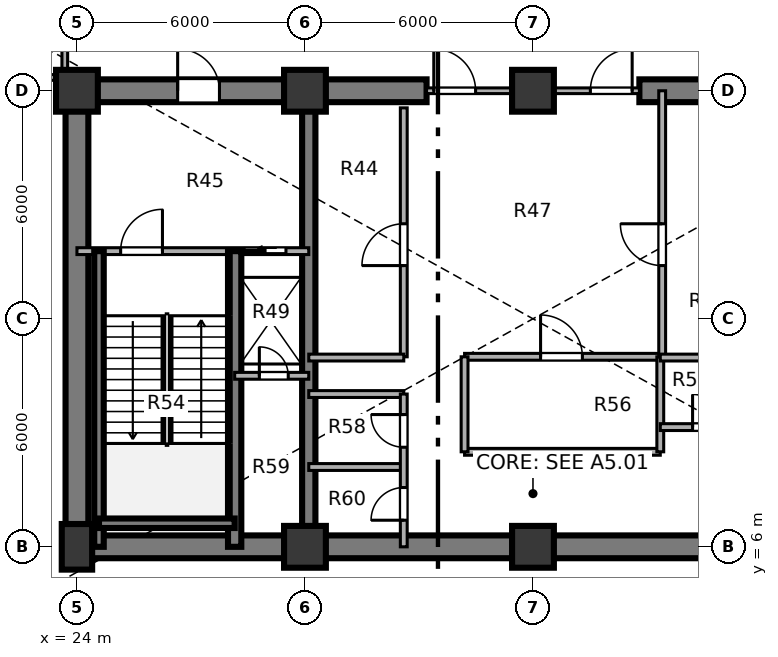
"""IFC4 building model, lengths in metres.
Left out: names, types, materials, properties, quantities, classifications, styles, units other than length and angle.
Written with IfcOpenShell. Run it as: python <this file> out.ifc"""

import sys

from ifc_helpers import new_model, si_unit, direction, frame, frame_2d, origin, origin_2d, place, context, subcontext, project, spatial, rectangle, extrude, source, transform, mapped, element, fill, save


model = new_model("IFC4")
c1 = context("Model", 3, precision=1e-05, world=origin(), true_north=direction((0.0, 1.0)))
c2 = subcontext(c1, "Body", "Model", "MODEL_VIEW")
j1 = project(units=[si_unit("LENGTHUNIT", "METRE"), si_unit("PLANEANGLEUNIT", "RADIAN")], contexts=[c1])
p1 = place(None, origin())
s1 = spatial("IfcSite", under=j1, at=p1, CompositionType="ELEMENT")
p2 = place(p1, origin())
s2 = spatial("IfcBuilding", under=s1, at=p2, CompositionType="ELEMENT")
p3 = place(p2, frame((0.0, 0.0, -4.86)))
s3 = spatial("IfcBuildingStorey", under=s2, at=p3, CompositionType="ELEMENT", Elevation=-4.86)
m1 = source(origin(), c2, "Body", "SweptSolid", [
    extrude(rectangle(XDim=0.8, YDim=1.2, at=origin_2d()), origin(), (0.0, 0.0, 1.0), 4.86),
])
p4 = place(p3, frame((24.0, 6.0, 0.0), z_axis=(0.0, 0.0, 1.0), x_axis=(1.0, 0.0, 0.0)))
e1 = element("IfcColumn", 1, at=p4, inside=s3, PredefinedType="COLUMN", context=c2, shape_type="MappedRepresentation", body=[
    mapped(m1, transform((0.0, 0.0, 0.0), x_axis=(1.0, 0.0, 0.0), y_axis=(0.0, 1.0, 0.0), z_axis=(0.0, 0.0, 1.0), scale=1.0)),
])
m2 = source(origin(), c2, "Body", "SweptSolid", [
    extrude(rectangle(XDim=1.1, YDim=1.1, at=origin_2d()), origin(), (0.0, 0.0, 1.0), 4.86),
])
for number, where, z_axis, x_axis in (
    (2, (30.0, 6.0, 0.0), (0.0, 0.0, 1.0), (1.0, 0.0, 0.0)),
    (3, (36.0, 6.0, 0.0), (0.0, 0.0, 1.0), (1.0, 0.0, 0.0)),
    (4, (24.0, 18.0, 0.0), (0.0, 0.0, 1.0), (1.0, 0.0, 0.0)),
    (5, (30.0, 18.0, 0.0), (0.0, 0.0, 1.0), (1.0, 0.0, 0.0)),
    (6, (36.0, 18.0, 0.0), (0.0, 0.0, 1.0), (1.0, 0.0, 0.0)),
):
    element("IfcColumn", number, at=place(p3, frame(where, z_axis=z_axis, x_axis=x_axis)), inside=s3, PredefinedType="COLUMN", context=c2, shape_type="MappedRepresentation", body=[
        mapped(m2, transform((0.0, 0.0, 0.0), x_axis=(1.0, 0.0, 0.0), y_axis=(0.0, 1.0, 0.0), z_axis=(0.0, 0.0, 1.0), scale=1.0)),
    ])
p5 = place(p3, frame((48.3, 6.0, 0.0), z_axis=(0.0, 0.0, 1.0), x_axis=(-1.0, 0.0, 0.0)))
e7 = element("IfcWall", 7, at=p5, inside=s3, PredefinedType="SHEAR", context=c2, shape_type="SweptSolid", body=[
    extrude(rectangle(XDim=24.6, YDim=0.6, at=frame_2d((12.3, 0.0))), origin(), (0.0, 0.0, 1.0), 4.86),
])
p6 = place(p3, frame((24.0, 6.0, 0.0), z_axis=(0.0, 0.0, 1.0), x_axis=(0.0, 1.0, 0.0)))
e8 = element("IfcWall", 8, at=p6, inside=s3, PredefinedType="SHEAR", context=c2, shape_type="SweptSolid", body=[
    extrude(rectangle(XDim=12.0, YDim=0.6, at=frame_2d((6.0, 0.0))), origin(), (0.0, 0.0, 1.0), 4.86),
])
p7 = place(p3, frame((23.7, 18.0, 0.0), z_axis=(0.0, 0.0, 1.0), x_axis=(1.0, 0.0, 0.0)))
e9 = element("IfcWall", 9, at=p7, inside=s3, PredefinedType="SHEAR", context=c2, shape_type="SweptSolid", body=[
    extrude(rectangle(XDim=9.5, YDim=0.6, at=frame_2d((4.75, 0.0))), origin(), (0.0, 0.0, 1.0), 4.86),
])
p8 = place(p7, frame((2.95, 0.0, 0.0)))
e10 = element("IfcOpeningElement", 10, at=p8, cuts=e9, PredefinedType="OPENING", context=c2, shape_type="SweptSolid", body=[
    extrude(rectangle(XDim=1.1, YDim=2.1, at=origin_2d()), frame((0.55, 0.31, 1.05), z_axis=(0.0, -1.0, 0.0), x_axis=(1.0, 0.0, 0.0)), (0.0, 0.0, 1.0), 0.62),
])
p9 = place(p3, frame((38.8, 18.0, 0.0), z_axis=(0.0, 0.0, 1.0), x_axis=(1.0, 0.0, 0.0)))
e11 = element("IfcWall", 11, at=p9, inside=s3, PredefinedType="SHEAR", context=c2, shape_type="SweptSolid", body=[
    extrude(rectangle(XDim=9.5, YDim=0.6, at=frame_2d((4.75, 0.0))), origin(), (0.0, 0.0, 1.0), 4.86),
])
p10 = place(p9, frame((5.45, 0.0, 0.0)))
e12 = element("IfcOpeningElement", 12, at=p10, cuts=e11, PredefinedType="OPENING", context=c2, shape_type="SweptSolid", body=[
    extrude(rectangle(XDim=1.1, YDim=2.1, at=origin_2d()), frame((0.55, 0.31, 1.05), z_axis=(0.0, -1.0, 0.0), x_axis=(1.0, 0.0, 0.0)), (0.0, 0.0, 1.0), 0.62),
])
p11 = place(p3, frame((30.1, 6.0, 0.0), z_axis=(0.0, 0.0, 1.0), x_axis=(0.0, 1.0, 0.0)))
e13 = element("IfcWall", 13, at=p11, inside=s3, PredefinedType="SHEAR", context=c2, shape_type="SweptSolid", body=[
    extrude(rectangle(XDim=12.0, YDim=0.35, at=frame_2d((6.0, 0.0))), origin(), (0.0, 0.0, 1.0), 4.86),
])
p12 = place(p3, frame((32.6, 11.0, 0.0), z_axis=(0.0, 0.0, 1.0), x_axis=(0.0, 1.0, 0.0)))
e14 = element("IfcWall", 14, at=p12, inside=s3, PredefinedType="PARTITIONING", context=c2, shape_type="SweptSolid", body=[
    extrude(rectangle(XDim=6.55, YDim=0.18, at=frame_2d((3.275, 0.0))), origin(), (0.0, 0.0, 1.0), 4.51),
])
p13 = place(p12, frame((2.4, 0.0, 0.0)))
e15 = element("IfcOpeningElement", 15, at=p13, cuts=e14, PredefinedType="OPENING", context=c2, shape_type="SweptSolid", body=[
    extrude(rectangle(XDim=1.1, YDim=2.1, at=origin_2d()), frame((0.55, 0.1, 1.05), z_axis=(0.0, -1.0, 0.0), x_axis=(1.0, 0.0, 0.0)), (0.0, 0.0, 1.0), 0.2),
])
p14 = place(p3, frame((34.2, 11.0, 0.0), z_axis=(0.0, 0.0, 1.0), x_axis=(1.0, 0.0, 0.0)))
e16 = element("IfcWall", 16, at=p14, inside=s3, PredefinedType="PARTITIONING", context=c2, shape_type="SweptSolid", body=[
    extrude(rectangle(XDim=5.15, YDim=0.18, at=frame_2d((2.575, 0.0))), origin(), (0.0, 0.0, 1.0), 4.51),
])
p15 = place(p14, frame((2.0, 0.0, 0.0)))
e17 = element("IfcOpeningElement", 17, at=p15, cuts=e16, PredefinedType="OPENING", context=c2, shape_type="SweptSolid", body=[
    extrude(rectangle(XDim=1.1, YDim=2.1, at=origin_2d()), frame((0.55, 0.1, 1.05), z_axis=(0.0, -1.0, 0.0), x_axis=(1.0, 0.0, 0.0)), (0.0, 0.0, 1.0), 0.2),
])
p16 = place(p3, frame((34.2, 8.5, 0.0), z_axis=(0.0, 0.0, 1.0), x_axis=(1.0, 0.0, 0.0)))
e18 = element("IfcWall", 18, at=p16, inside=s3, PredefinedType="PARTITIONING", context=c2, shape_type="SweptSolid", body=[
    extrude(rectangle(XDim=5.15, YDim=0.18, at=frame_2d((2.575, 0.0))), origin(), (0.0, 0.0, 1.0), 4.51),
])
for number, where, z_axis, x_axis in (
    (19, (34.2, 8.5, 0.0), (0.0, 0.0, 1.0), (0.0, 1.0, 0.0)),
    (20, (39.35, 8.5, 0.0), (0.0, 0.0, 1.0), (0.0, 1.0, 0.0)),
):
    element("IfcWall", number, at=place(p3, frame(where, z_axis=z_axis, x_axis=x_axis)), inside=s3, PredefinedType="PARTITIONING", context=c2, shape_type="SweptSolid", body=[
        extrude(rectangle(XDim=2.5, YDim=0.18, at=frame_2d((1.25, 0.0))), origin(), (0.0, 0.0, 1.0), 4.51),
    ])
p17 = place(p3, frame((39.4, 11.0, 0.0), z_axis=(0.0, 0.0, 1.0), x_axis=(0.0, 1.0, 0.0)))
e21 = element("IfcWall", 21, at=p17, inside=s3, PredefinedType="PARTITIONING", context=c2, shape_type="SweptSolid", body=[
    extrude(rectangle(XDim=7.0, YDim=0.18, at=frame_2d((3.5, 0.0))), origin(), (0.0, 0.0, 1.0), 4.51),
])
p18 = place(p17, frame((2.4, 0.0, 0.0)))
e22 = element("IfcOpeningElement", 22, at=p18, cuts=e21, PredefinedType="OPENING", context=c2, shape_type="SweptSolid", body=[
    extrude(rectangle(XDim=1.1, YDim=2.1, at=origin_2d()), frame((0.55, 0.1, 1.05), z_axis=(0.0, -1.0, 0.0), x_axis=(1.0, 0.0, 0.0)), (0.0, 0.0, 1.0), 0.2),
])
p19 = place(p3, frame((30.1, 10.98, 0.0), z_axis=(0.0, 0.0, 1.0), x_axis=(1.0, 0.0, 0.0)))
e23 = element("IfcWall", 23, at=p19, inside=s3, PredefinedType="PARTITIONING", context=c2, shape_type="SweptSolid", body=[
    extrude(rectangle(XDim=2.5, YDim=0.18, at=frame_2d((1.25, 0.0))), origin(), (0.0, 0.0, 1.0), 4.51),
])
p20 = place(p3, frame((39.35, 10.98, 0.0), z_axis=(0.0, 0.0, 1.0), x_axis=(1.0, 0.0, 0.0)))
e24 = element("IfcWall", 24, at=p20, inside=s3, PredefinedType="PARTITIONING", context=c2, shape_type="SweptSolid", body=[
    extrude(rectangle(XDim=2.55, YDim=0.18, at=frame_2d((1.275, 0.0))), origin(), (0.0, 0.0, 1.0), 4.51),
])
for number, where, z_axis, x_axis in (
    (25, (30.1, 8.1, 0.0), (0.0, 0.0, 1.0), (1.0, 0.0, 0.0)),
    (26, (30.1, 10.02, 0.0), (0.0, 0.0, 1.0), (1.0, 0.0, 0.0)),
):
    element("IfcWall", number, at=place(p3, frame(where, z_axis=z_axis, x_axis=x_axis)), inside=s3, PredefinedType="PARTITIONING", context=c2, shape_type="SweptSolid", body=[
        extrude(rectangle(XDim=2.5, YDim=0.18, at=frame_2d((1.25, 0.0))), origin(), (0.0, 0.0, 1.0), 4.51),
    ])
p21 = place(p3, frame((32.6, 6.0, 0.0), z_axis=(0.0, 0.0, 1.0), x_axis=(0.0, 1.0, 0.0)))
e27 = element("IfcWall", 27, at=p21, inside=s3, PredefinedType="PARTITIONING", context=c2, shape_type="SweptSolid", body=[
    extrude(rectangle(XDim=4.02, YDim=0.18, at=frame_2d((2.01, 0.0))), origin(), (0.0, 0.0, 1.0), 4.51),
])
p22 = place(p21, frame((0.7, 0.0, 0.0)))
e28 = element("IfcOpeningElement", 28, at=p22, cuts=e27, PredefinedType="OPENING", context=c2, shape_type="SweptSolid", body=[
    extrude(rectangle(XDim=0.86, YDim=2.1, at=origin_2d()), frame((0.43, 0.1, 1.05), z_axis=(0.0, -1.0, 0.0), x_axis=(1.0, 0.0, 0.0)), (0.0, 0.0, 1.0), 0.2),
])
p23 = place(p21, frame((2.62, 0.0, 0.0)))
e29 = element("IfcOpeningElement", 29, at=p23, cuts=e27, PredefinedType="OPENING", context=c2, shape_type="SweptSolid", body=[
    extrude(rectangle(XDim=0.86, YDim=2.1, at=origin_2d()), frame((0.43, 0.1, 1.05), z_axis=(0.0, -1.0, 0.0), x_axis=(1.0, 0.0, 0.0)), (0.0, 0.0, 1.0), 0.2),
])
p24 = place(p3, frame((39.35, 9.15, 0.0), z_axis=(0.0, 0.0, 1.0), x_axis=(1.0, 0.0, 0.0)))
e30 = element("IfcWall", 30, at=p24, inside=s3, PredefinedType="PARTITIONING", context=c2, shape_type="SweptSolid", body=[
    extrude(rectangle(XDim=2.55, YDim=0.18, at=frame_2d((1.275, 0.0))), origin(), (0.0, 0.0, 1.0), 4.51),
])
p25 = place(p24, frame((0.85, 0.0, 0.0)))
e31 = element("IfcOpeningElement", 31, at=p25, cuts=e30, PredefinedType="OPENING", context=c2, shape_type="SweptSolid", body=[
    extrude(rectangle(XDim=0.86, YDim=2.1, at=origin_2d()), frame((0.43, 0.1, 1.05), z_axis=(0.0, -1.0, 0.0), x_axis=(1.0, 0.0, 0.0)), (0.0, 0.0, 1.0), 0.2),
])
p26 = place(p3, frame((33.2, 18.0, 0.0), z_axis=(0.0, 0.0, 1.0), x_axis=(1.0, 0.0, 0.0)))
e32 = element("IfcWall", 32, at=p26, inside=s3, PredefinedType="PARTITIONING", context=c2, shape_type="SweptSolid", body=[
    extrude(rectangle(XDim=5.6, YDim=0.15, at=frame_2d((2.8, 0.0))), origin(), (0.0, 0.0, 1.0), 3.325),
])
p27 = place(p26, frame((0.19, 0.0, 0.0)))
e33 = element("IfcOpeningElement", 33, at=p27, cuts=e32, PredefinedType="OPENING", context=c2, shape_type="SweptSolid", body=[
    extrude(rectangle(XDim=1.1, YDim=2.1, at=origin_2d()), frame((0.55, 0.085, 1.05), z_axis=(0.0, -1.0, 0.0), x_axis=(1.0, 0.0, 0.0)), (0.0, 0.0, 1.0), 0.17),
])
p28 = place(p26, frame((4.31, 0.0, 0.0)))
e34 = element("IfcOpeningElement", 34, at=p28, cuts=e32, PredefinedType="OPENING", context=c2, shape_type="SweptSolid", body=[
    extrude(rectangle(XDim=1.1, YDim=2.1, at=origin_2d()), frame((0.55, 0.085, 1.05), z_axis=(0.0, -1.0, 0.0), x_axis=(1.0, 0.0, 0.0)), (0.0, 0.0, 1.0), 0.17),
])
p29 = place(p3, frame((24.0, 13.78, 0.0), z_axis=(0.0, 0.0, 1.0), x_axis=(1.0, 0.0, 0.0)))
e35 = element("IfcWall", 35, at=p29, inside=s3, PredefinedType="PARTITIONING", context=c2, shape_type="SweptSolid", body=[
    extrude(rectangle(XDim=6.1, YDim=0.18, at=frame_2d((3.05, 0.0))), origin(), (0.0, 0.0, 1.0), 4.51),
])
p30 = place(p29, frame((1.15, 0.0, 0.0)))
e36 = element("IfcOpeningElement", 36, at=p30, cuts=e35, PredefinedType="OPENING", context=c2, shape_type="SweptSolid", body=[
    extrude(rectangle(XDim=1.1, YDim=2.1, at=origin_2d()), frame((0.55, 0.1, 1.05), z_axis=(0.0, -1.0, 0.0), x_axis=(1.0, 0.0, 0.0)), (0.0, 0.0, 1.0), 0.2),
])
p31 = place(p29, frame((4.4, 0.0, 0.0)))
e37 = element("IfcOpeningElement", 37, at=p31, cuts=e35, PredefinedType="OPENING", context=c2, shape_type="SweptSolid", body=[
    extrude(rectangle(XDim=1.1, YDim=2.1, at=origin_2d()), frame((0.55, 0.1, 1.05), z_axis=(0.0, -1.0, 0.0), x_axis=(1.0, 0.0, 0.0)), (0.0, 0.0, 1.0), 0.2),
])
p32 = place(p3, frame((28.15, 6.0, 0.0), z_axis=(0.0, 0.0, 1.0), x_axis=(0.0, 1.0, 0.0)))
e38 = element("IfcWall", 38, at=p32, inside=s3, PredefinedType="SHEAR", context=c2, shape_type="SweptSolid", body=[
    extrude(rectangle(XDim=7.78, YDim=0.35, at=frame_2d((3.89, 0.0))), origin(), (0.0, 0.0, 1.0), 4.86),
])
p33 = place(p3, frame((24.58, 6.0, 0.0), z_axis=(0.0, 0.0, 1.0), x_axis=(0.0, 1.0, 0.0)))
e39 = element("IfcWall", 39, at=p33, inside=s3, PredefinedType="SHEAR", context=c2, shape_type="SweptSolid", body=[
    extrude(rectangle(XDim=7.78, YDim=0.25, at=frame_2d((3.89, 0.0))), origin(), (0.0, 0.0, 1.0), 4.86),
])
p34 = place(p3, frame((24.58, 6.62, 0.0), z_axis=(0.0, 0.0, 1.0), x_axis=(1.0, 0.0, 0.0)))
e40 = element("IfcWall", 40, at=p34, inside=s3, PredefinedType="SHEAR", context=c2, shape_type="SweptSolid", body=[
    extrude(rectangle(XDim=3.57, YDim=0.25, at=frame_2d((1.785, 0.0))), origin(), (0.0, 0.0, 1.0), 4.86),
])
p35 = place(p3, frame((28.15, 10.5, 0.0), z_axis=(0.0, 0.0, 1.0), x_axis=(1.0, 0.0, 0.0)))
e41 = element("IfcWall", 41, at=p35, inside=s3, PredefinedType="PARTITIONING", context=c2, shape_type="SweptSolid", body=[
    extrude(rectangle(XDim=1.95, YDim=0.18, at=frame_2d((0.975, 0.0))), origin(), (0.0, 0.0, 1.0), 4.51),
])
p36 = place(p35, frame((0.65, 0.0, 0.0)))
e42 = element("IfcOpeningElement", 42, at=p36, cuts=e41, PredefinedType="OPENING", context=c2, shape_type="SweptSolid", body=[
    extrude(rectangle(XDim=0.76, YDim=2.05, at=origin_2d()), frame((0.38, 0.1, 1.025), z_axis=(0.0, -1.0, 0.0), x_axis=(1.0, 0.0, 0.0)), (0.0, 0.0, 1.0), 0.2),
])
p37 = place(p3, frame((20.0, 18.35, 0.0), z_axis=(0.0, 0.0, 1.0), x_axis=(1.0, 0.0, 0.0)))
e43 = element("IfcWall", 43, at=p37, inside=s3, PredefinedType="PARTITIONING", context=c2, shape_type="SweptSolid", body=[
    extrude(rectangle(XDim=3.68, YDim=0.15, at=frame_2d((1.84, 0.0))), origin(), (0.0, 0.0, 1.0), 4.51),
])
p38 = place(p3, frame((23.68, 18.35, 0.0), z_axis=(0.0, 0.0, 1.0), x_axis=(0.0, 1.0, 0.0)))
e44 = element("IfcWall", 44, at=p38, inside=s3, PredefinedType="PARTITIONING", context=c2, shape_type="SweptSolid", body=[
    extrude(rectangle(XDim=10.65, YDim=0.15, at=frame_2d((5.325, 0.0))), origin(), (0.0, 0.0, 1.0), 4.51),
])
p39 = place(p38, frame((5.1, 0.0, 0.0)))
e45 = element("IfcOpeningElement", 45, at=p39, cuts=e44, PredefinedType="OPENING", context=c2, shape_type="SweptSolid", body=[
    extrude(rectangle(XDim=1.1, YDim=2.1, at=origin_2d()), frame((0.55, 0.085, 1.05), z_axis=(0.0, -1.0, 0.0), x_axis=(1.0, 0.0, 0.0)), (0.0, 0.0, 1.0), 0.17),
])
m3 = source(origin(), c2, "Body", "SweptSolid", [
    extrude(rectangle(XDim=1.1, YDim=2.1, at=origin_2d()), frame((0.55, 0.025, 1.05), z_axis=(0.0, -1.0, 0.0), x_axis=(1.0, 0.0, 0.0)), (0.0, 0.0, 1.0), 0.05),
])
p40 = place(p13, origin())
e46 = element("IfcDoor", 46, at=p40, inside=s3, OperationType="SINGLE_SWING_LEFT", PredefinedType="DOOR", context=c2, shape_type="MappedRepresentation", body=[
    mapped(m3, transform((0.0, 0.0, 0.0), x_axis=(1.0, 0.0, 0.0), y_axis=(0.0, 1.0, 0.0), z_axis=(0.0, 0.0, 1.0), scale=1.0)),
])
fill(e15, e46)
p41 = place(p15, origin())
e47 = element("IfcDoor", 47, at=p41, inside=s3, OperationType="SINGLE_SWING_LEFT", PredefinedType="DOOR", context=c2, shape_type="MappedRepresentation", body=[
    mapped(m3, transform((0.0, 0.0, 0.0), x_axis=(1.0, 0.0, 0.0), y_axis=(0.0, 1.0, 0.0), z_axis=(0.0, 0.0, 1.0), scale=1.0)),
])
fill(e17, e47)
p42 = place(p18, origin())
e48 = element("IfcDoor", 48, at=p42, inside=s3, OperationType="SINGLE_SWING_RIGHT", PredefinedType="DOOR", context=c2, shape_type="MappedRepresentation", body=[
    mapped(m3, transform((0.0, 0.0, 0.0), x_axis=(1.0, 0.0, 0.0), y_axis=(0.0, 1.0, 0.0), z_axis=(0.0, 0.0, 1.0), scale=1.0)),
])
fill(e22, e48)
m4 = source(origin(), c2, "Body", "SweptSolid", [
    extrude(rectangle(XDim=0.86, YDim=2.1, at=origin_2d()), frame((0.43, 0.025, 1.05), z_axis=(0.0, -1.0, 0.0), x_axis=(1.0, 0.0, 0.0)), (0.0, 0.0, 1.0), 0.05),
])
p43 = place(p22, origin())
e49 = element("IfcDoor", 49, at=p43, inside=s3, OperationType="SINGLE_SWING_LEFT", PredefinedType="DOOR", context=c2, shape_type="MappedRepresentation", body=[
    mapped(m4, transform((0.0, 0.0, 0.0), x_axis=(1.0, 0.0, 0.0), y_axis=(0.0, 1.0, 0.0), z_axis=(0.0, 0.0, 1.0), scale=1.0)),
])
fill(e28, e49)
p44 = place(p23, origin())
e50 = element("IfcDoor", 50, at=p44, inside=s3, OperationType="SINGLE_SWING_RIGHT", PredefinedType="DOOR", context=c2, shape_type="MappedRepresentation", body=[
    mapped(m4, transform((0.0, 0.0, 0.0), x_axis=(1.0, 0.0, 0.0), y_axis=(0.0, 1.0, 0.0), z_axis=(0.0, 0.0, 1.0), scale=1.0)),
])
fill(e29, e50)
p45 = place(p25, origin())
e51 = element("IfcDoor", 51, at=p45, inside=s3, OperationType="SINGLE_SWING_LEFT", PredefinedType="DOOR", context=c2, shape_type="MappedRepresentation", body=[
    mapped(m4, transform((0.0, 0.0, 0.0), x_axis=(1.0, 0.0, 0.0), y_axis=(0.0, 1.0, 0.0), z_axis=(0.0, 0.0, 1.0), scale=1.0)),
])
fill(e31, e51)
m5 = source(origin(), c2, "Body", "SweptSolid", [
    extrude(rectangle(XDim=1.1, YDim=2.1, at=origin_2d()), frame((0.55, 0.025, 1.05), z_axis=(0.0, -1.0, 0.0), x_axis=(1.0, 0.0, 0.0)), (0.0, 0.0, 1.0), 0.05),
])
p46 = place(p27, origin())
e52 = element("IfcDoor", 52, at=p46, inside=s3, OperationType="SINGLE_SWING_LEFT", PredefinedType="DOOR", context=c2, shape_type="MappedRepresentation", body=[
    mapped(m5, transform((0.0, 0.0, 0.0), x_axis=(1.0, 0.0, 0.0), y_axis=(0.0, 1.0, 0.0), z_axis=(0.0, 0.0, 1.0), scale=1.0)),
])
fill(e33, e52)
p47 = place(p28, origin())
e53 = element("IfcDoor", 53, at=p47, inside=s3, OperationType="SINGLE_SWING_RIGHT", PredefinedType="DOOR", context=c2, shape_type="MappedRepresentation", body=[
    mapped(m5, transform((0.0, 0.0, 0.0), x_axis=(1.0, 0.0, 0.0), y_axis=(0.0, 1.0, 0.0), z_axis=(0.0, 0.0, 1.0), scale=1.0)),
])
fill(e34, e53)
m6 = source(origin(), c2, "Body", "SweptSolid", [
    extrude(rectangle(XDim=1.1, YDim=2.1, at=origin_2d()), frame((0.55, 0.025, 1.05), z_axis=(0.0, -1.0, 0.0), x_axis=(1.0, 0.0, 0.0)), (0.0, 0.0, 1.0), 0.05),
])
p48 = place(p30, origin())
e54 = element("IfcDoor", 54, at=p48, inside=s3, OperationType="SINGLE_SWING_RIGHT", PredefinedType="DOOR", context=c2, shape_type="MappedRepresentation", body=[
    mapped(m6, transform((0.0, 0.0, 0.0), x_axis=(1.0, 0.0, 0.0), y_axis=(0.0, 1.0, 0.0), z_axis=(0.0, 0.0, 1.0), scale=1.0)),
])
fill(e36, e54)
m7 = source(origin(), c2, "Body", "SweptSolid", [
    extrude(rectangle(XDim=1.1, YDim=2.1, at=origin_2d()), frame((0.55, 0.025, 1.05), z_axis=(0.0, -1.0, 0.0), x_axis=(1.0, 0.0, 0.0)), (0.0, 0.0, 1.0), 0.05),
])
p49 = place(p31, origin())
e55 = element("IfcDoor", 55, at=p49, inside=s3, OperationType="SLIDING_TO_LEFT", PredefinedType="DOOR", context=c2, shape_type="MappedRepresentation", body=[
    mapped(m7, transform((0.0, 0.0, 0.0), x_axis=(1.0, 0.0, 0.0), y_axis=(0.0, 1.0, 0.0), z_axis=(0.0, 0.0, 1.0), scale=1.0)),
])
fill(e37, e55)
m8 = source(origin(), c2, "Body", "SweptSolid", [
    extrude(rectangle(XDim=0.76, YDim=2.05, at=origin_2d()), frame((0.38, 0.025, 1.025), z_axis=(0.0, -1.0, 0.0), x_axis=(1.0, 0.0, 0.0)), (0.0, 0.0, 1.0), 0.05),
])
p50 = place(p36, origin())
e56 = element("IfcDoor", 56, at=p50, inside=s3, OperationType="SINGLE_SWING_LEFT", PredefinedType="DOOR", context=c2, shape_type="MappedRepresentation", body=[
    mapped(m8, transform((0.0, 0.0, 0.0), x_axis=(1.0, 0.0, 0.0), y_axis=(0.0, 1.0, 0.0), z_axis=(0.0, 0.0, 1.0), scale=1.0)),
])
fill(e42, e56)
p51 = place(p8, origin())
e57 = element("IfcDoor", 57, at=p51, inside=s3, OperationType="SINGLE_SWING_LEFT", PredefinedType="DOOR", context=c2, shape_type="MappedRepresentation", body=[
    mapped(m5, transform((0.0, 0.0, 0.0), x_axis=(1.0, 0.0, 0.0), y_axis=(0.0, 1.0, 0.0), z_axis=(0.0, 0.0, 1.0), scale=1.0)),
])
fill(e10, e57)
save(model, sys.argv[1])
